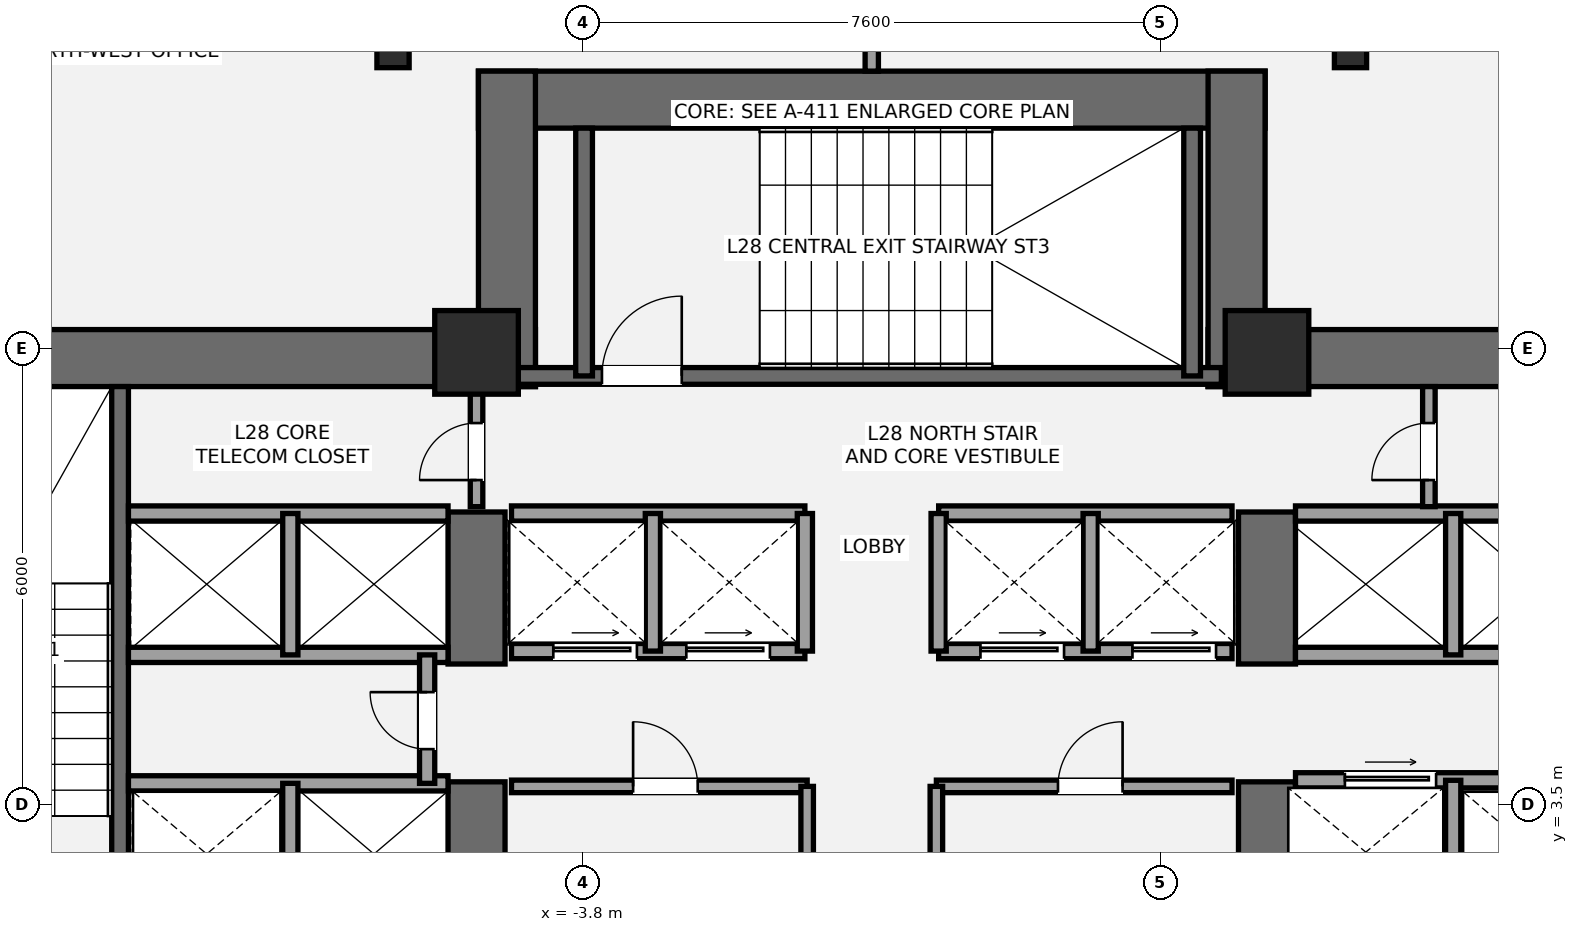
"""IFC4 building model, lengths in metres.
Left out: names, types, materials, properties, quantities, classifications, styles, units other than length and angle.
Written with IfcOpenShell. Run it as: python <this file> out.ifc"""

import sys

from ifc_helpers import new_model, si_unit, direction, frame, frame_2d, origin, origin_2d, place, context, subcontext, project, spatial, rectangle, i_section, extrude, element, fill, save


model = new_model("IFC4")
c1 = context("Model", 3, precision=1e-05, world=origin(), true_north=direction((0.0, 1.0)))
c2 = subcontext(c1, "Body", "Model", "MODEL_VIEW")
j1 = project(units=[si_unit("LENGTHUNIT", "METRE"), si_unit("PLANEANGLEUNIT", "RADIAN")], contexts=[c1])
p1 = place(None, origin())
s1 = spatial("IfcSite", under=j1, at=p1, CompositionType="ELEMENT")
p2 = place(p1, origin())
s2 = spatial("IfcBuilding", under=s1, at=p2, CompositionType="ELEMENT")
p3 = place(p2, frame((0.0, 0.0, 107.1)))
s3 = spatial("IfcBuildingStorey", under=s2, at=p3, CompositionType="ELEMENT", Elevation=107.1)
p4 = place(p3, frame((-13.9, 9.375, 0.0), z_axis=(0.0, 0.0, 1.0), x_axis=(1.0, 0.0, 0.0)))
e1 = element("IfcWall", 1, at=p4, inside=s3, PredefinedType="SHEAR", context=c2, shape_type="SweptSolid", body=[
    extrude(rectangle(XDim=9.475, YDim=0.75, at=frame_2d((4.737, 0.0))), origin(), (0.0, 0.0, 1.0), 3.5),
])
p5 = place(p3, frame((-5.2, 1.1, 0.0), z_axis=(0.0, 0.0, 1.0), x_axis=(0.0, 1.0, 0.0)))
e2 = element("IfcWall", 2, at=p5, inside=s3, PredefinedType="SHEAR", context=c2, shape_type="SweptSolid", body=[
    extrude(rectangle(XDim=2.7, YDim=0.75, at=frame_2d((1.35, 0.0))), origin(), (0.0, 0.0, 1.0), 3.5),
])
p6 = place(p3, frame((-5.2, 5.35, 0.0), z_axis=(0.0, 0.0, 1.0), x_axis=(0.0, 1.0, 0.0)))
e3 = element("IfcWall", 3, at=p6, inside=s3, PredefinedType="SHEAR", context=c2, shape_type="SweptSolid", body=[
    extrude(rectangle(XDim=2.0, YDim=0.75, at=frame_2d((1.0, 0.0))), origin(), (0.0, 0.0, 1.0), 3.5),
])
p7 = place(p3, frame((-9.89, 1.85, 0.0), z_axis=(0.0, 0.0, 1.0), x_axis=(0.0, 1.0, 0.0)))
e4 = element("IfcWall", 4, at=p7, inside=s3, PredefinedType="SHEAR", context=c2, shape_type="SweptSolid", body=[
    extrude(rectangle(XDim=7.15, YDim=0.22, at=frame_2d((3.575, 0.0))), origin(), (0.0, 0.0, 1.0), 3.5),
])
p8 = place(p3, frame((4.425, 9.375, 0.0), z_axis=(0.0, 0.0, 1.0), x_axis=(1.0, 0.0, 0.0)))
e5 = element("IfcWall", 5, at=p8, inside=s3, PredefinedType="SHEAR", context=c2, shape_type="SweptSolid", body=[
    extrude(rectangle(XDim=9.475, YDim=0.75, at=frame_2d((4.737, 0.0))), origin(), (0.0, 0.0, 1.0), 3.5),
])
p9 = place(p3, frame((5.2, 1.1, 0.0), z_axis=(0.0, 0.0, 1.0), x_axis=(0.0, 1.0, 0.0)))
e6 = element("IfcWall", 6, at=p9, inside=s3, PredefinedType="SHEAR", context=c2, shape_type="SweptSolid", body=[
    extrude(rectangle(XDim=2.7, YDim=0.75, at=frame_2d((1.35, 0.0))), origin(), (0.0, 0.0, 1.0), 3.5),
])
p10 = place(p3, frame((5.2, 5.35, 0.0), z_axis=(0.0, 0.0, 1.0), x_axis=(0.0, 1.0, 0.0)))
e7 = element("IfcWall", 7, at=p10, inside=s3, PredefinedType="SHEAR", context=c2, shape_type="SweptSolid", body=[
    extrude(rectangle(XDim=2.0, YDim=0.75, at=frame_2d((1.0, 0.0))), origin(), (0.0, 0.0, 1.0), 3.5),
])
p11 = place(p3, frame((-5.175, 12.775, 0.0), z_axis=(0.0, 0.0, 1.0), x_axis=(1.0, 0.0, 0.0)))
e8 = element("IfcWall", 8, at=p11, inside=s3, PredefinedType="SHEAR", context=c2, shape_type="SweptSolid", body=[
    extrude(rectangle(XDim=10.35, YDim=0.75, at=frame_2d((5.175, 0.0))), origin(), (0.0, 0.0, 1.0), 3.5),
])
for number, where, z_axis, x_axis in (
    (9, (-4.8, 9.0, 0.0), (0.0, 0.0, 1.0), (0.0, 1.0, 0.0)),
    (10, (4.8, 9.0, 0.0), (0.0, 0.0, 1.0), (0.0, 1.0, 0.0)),
):
    element("IfcWall", number, at=place(p3, frame(where, z_axis=z_axis, x_axis=x_axis)), inside=s3, PredefinedType="SHEAR", context=c2, shape_type="SweptSolid", body=[
        extrude(rectangle(XDim=4.15, YDim=0.75, at=frame_2d((2.075, 0.0))), origin(), (0.0, 0.0, 1.0), 3.5),
    ])
p12 = place(p3, frame((-4.7, 9.14, 0.0), z_axis=(0.0, 0.0, 1.0), x_axis=(1.0, 0.0, 0.0)))
e11 = element("IfcWall", 11, at=p12, inside=s3, PredefinedType="SHEAR", context=c2, shape_type="SweptSolid", body=[
    extrude(rectangle(XDim=9.3, YDim=0.22, at=frame_2d((4.65, 0.0))), origin(), (0.0, 0.0, 1.0), 3.5),
])
p13 = place(p12, frame((1.15, 0.0, 0.0)))
e12 = element("IfcOpeningElement", 12, at=p13, cuts=e11, PredefinedType="OPENING", context=c2, shape_type="SweptSolid", body=[
    extrude(rectangle(XDim=1.05, YDim=2.15, at=frame_2d((0.525, 1.075))), frame((0.0, 0.12, 0.0), z_axis=(0.0, -1.0, 0.0), x_axis=(1.0, 0.0, 0.0)), (0.0, 0.0, 1.0), 0.24),
])
for number, where, z_axis, x_axis in (
    (13, (-3.785, 9.14, 0.0), (0.0, 0.0, 1.0), (0.0, 1.0, 0.0)),
    (14, (4.215, 9.14, 0.0), (0.0, 0.0, 1.0), (0.0, 1.0, 0.0)),
):
    element("IfcWall", number, at=place(p3, frame(where, z_axis=z_axis, x_axis=x_axis)), inside=s3, PredefinedType="SHEAR", context=c2, shape_type="SweptSolid", body=[
        extrude(rectangle(XDim=3.26, YDim=0.22, at=frame_2d((1.63, 0.0))), origin(), (0.0, 0.0, 1.0), 3.5),
    ])
for number, where, z_axis, x_axis in (
    (15, (-5.2, 9.45, 0.0), (0.0, 0.0, 1.0), (1.0, 0.0, 0.0)),
    (16, (5.2, 9.45, 0.0), (0.0, 0.0, 1.0), (1.0, 0.0, 0.0)),
):
    element("IfcColumn", number, at=place(p3, frame(where, z_axis=z_axis, x_axis=x_axis)), inside=s3, PredefinedType="COLUMN", context=c2, shape_type="SweptSolid", body=[
        extrude(rectangle(XDim=1.1, YDim=1.1, at=origin_2d()), origin(), (0.0, 0.0, 1.0), 3.5),
    ])
for number, where, z_axis, x_axis in (
    (17, (6.299, 13.433, 0.0), (0.0, 0.0, 1.0), (1.0, 0.0, 0.0)),
    (18, (-6.299, 13.433, 0.0), (0.0, 0.0, 1.0), (1.0, 0.0, 0.0)),
):
    element("IfcColumn", number, at=place(p3, frame(where, z_axis=z_axis, x_axis=x_axis)), inside=s3, PredefinedType="COLUMN", context=c2, shape_type="SweptSolid", body=[
        extrude(i_section(OverallWidth=0.424, OverallDepth=0.474, WebThickness=0.048, FlangeThickness=0.077, at=origin_2d()), origin(), (0.0, 0.0, 1.0), 3.5),
    ])
p14 = place(p3, frame((-9.78, 3.78, 0.0), z_axis=(0.0, 0.0, 1.0), x_axis=(1.0, 0.0, 0.0)))
e19 = element("IfcWall", 19, at=p14, inside=s3, PredefinedType="SOLIDWALL", context=c2, shape_type="SweptSolid", body=[
    extrude(rectangle(XDim=4.205, YDim=0.2, at=frame_2d((2.103, 0.0))), origin(), (0.0, 0.0, 1.0), 3.31),
])
p15 = place(p3, frame((-7.65, 1.85, 0.0), z_axis=(0.0, 0.0, 1.0), x_axis=(0.0, 1.0, 0.0)))
e20 = element("IfcWall", 20, at=p15, inside=s3, PredefinedType="SOLIDWALL", context=c2, shape_type="SweptSolid", body=[
    extrude(rectangle(XDim=1.93, YDim=0.2, at=frame_2d((0.965, 0.0))), origin(), (0.0, 0.0, 1.0), 3.31),
])
for number, where, z_axis, x_axis in (
    (21, (-9.78, 5.47, 0.0), (0.0, 0.0, 1.0), (1.0, 0.0, 0.0)),
    (22, (-9.78, 7.33, 0.0), (0.0, 0.0, 1.0), (1.0, 0.0, 0.0)),
):
    element("IfcWall", number, at=place(p3, frame(where, z_axis=z_axis, x_axis=x_axis)), inside=s3, PredefinedType="SOLIDWALL", context=c2, shape_type="SweptSolid", body=[
        extrude(rectangle(XDim=4.205, YDim=0.2, at=frame_2d((2.103, 0.0))), origin(), (0.0, 0.0, 1.0), 3.31),
    ])
p16 = place(p3, frame((-7.65, 5.47, 0.0), z_axis=(0.0, 0.0, 1.0), x_axis=(0.0, 1.0, 0.0)))
e23 = element("IfcWall", 23, at=p16, inside=s3, PredefinedType="SOLIDWALL", context=c2, shape_type="SweptSolid", body=[
    extrude(rectangle(XDim=1.86, YDim=0.2, at=frame_2d((0.93, 0.0))), origin(), (0.0, 0.0, 1.0), 3.31),
])
p17 = place(p3, frame((-5.85, 3.78, 0.0), z_axis=(0.0, 0.0, 1.0), x_axis=(0.0, 1.0, 0.0)))
e24 = element("IfcWall", 24, at=p17, inside=s3, PredefinedType="SOLIDWALL", context=c2, shape_type="SweptSolid", body=[
    extrude(rectangle(XDim=1.69, YDim=0.2, at=frame_2d((0.845, 0.0))), origin(), (0.0, 0.0, 1.0), 3.31),
])
p18 = place(p17, frame((0.45, 0.0, 0.0)))
e25 = element("IfcOpeningElement", 25, at=p18, cuts=e24, PredefinedType="OPENING", context=c2, shape_type="SweptSolid", body=[
    extrude(rectangle(XDim=0.75, YDim=2.1, at=frame_2d((0.375, 1.05))), frame((0.0, 0.11, 0.0), z_axis=(0.0, -1.0, 0.0), x_axis=(1.0, 0.0, 0.0)), (0.0, 0.0, 1.0), 0.22),
])
p19 = place(p3, frame((5.575, 3.82, 0.0), z_axis=(0.0, 0.0, 1.0), x_axis=(1.0, 0.0, 0.0)))
e26 = element("IfcWall", 26, at=p19, inside=s3, PredefinedType="SOLIDWALL", context=c2, shape_type="SweptSolid", body=[
    extrude(rectangle(XDim=4.205, YDim=0.2, at=frame_2d((2.103, 0.0))), origin(), (0.0, 0.0, 1.0), 3.31),
])
p20 = place(p19, frame((0.65, 0.0, 0.0)))
e27 = element("IfcOpeningElement", 27, at=p20, cuts=e26, PredefinedType="OPENING", context=c2, shape_type="SweptSolid", body=[
    extrude(rectangle(XDim=1.2, YDim=2.2, at=frame_2d((0.6, 1.1))), frame((0.0, 0.11, 0.0), z_axis=(0.0, -1.0, 0.0), x_axis=(1.0, 0.0, 0.0)), (0.0, 0.0, 1.0), 0.22),
])
p21 = place(p3, frame((7.65, 1.85, 0.0), z_axis=(0.0, 0.0, 1.0), x_axis=(0.0, 1.0, 0.0)))
e28 = element("IfcWall", 28, at=p21, inside=s3, PredefinedType="SOLIDWALL", context=c2, shape_type="SweptSolid", body=[
    extrude(rectangle(XDim=1.97, YDim=0.2, at=frame_2d((0.985, 0.0))), origin(), (0.0, 0.0, 1.0), 3.31),
])
for number, where, z_axis, x_axis in (
    (29, (5.575, 5.47, 0.0), (0.0, 0.0, 1.0), (1.0, 0.0, 0.0)),
    (30, (5.575, 7.33, 0.0), (0.0, 0.0, 1.0), (1.0, 0.0, 0.0)),
):
    element("IfcWall", number, at=place(p3, frame(where, z_axis=z_axis, x_axis=x_axis)), inside=s3, PredefinedType="SOLIDWALL", context=c2, shape_type="SweptSolid", body=[
        extrude(rectangle(XDim=4.205, YDim=0.2, at=frame_2d((2.103, 0.0))), origin(), (0.0, 0.0, 1.0), 3.31),
    ])
p22 = place(p3, frame((7.65, 5.47, 0.0), z_axis=(0.0, 0.0, 1.0), x_axis=(0.0, 1.0, 0.0)))
e31 = element("IfcWall", 31, at=p22, inside=s3, PredefinedType="SOLIDWALL", context=c2, shape_type="SweptSolid", body=[
    extrude(rectangle(XDim=1.86, YDim=0.2, at=frame_2d((0.93, 0.0))), origin(), (0.0, 0.0, 1.0), 3.31),
])
p23 = place(p3, frame((-4.74, 3.74, 0.0), z_axis=(0.0, 0.0, 1.0), x_axis=(1.0, 0.0, 0.0)))
e32 = element("IfcWall", 32, at=p23, inside=s3, PredefinedType="PARTITIONING", context=c2, shape_type="SweptSolid", body=[
    extrude(rectangle(XDim=3.89, YDim=0.165, at=frame_2d((1.945, 0.0))), origin(), (0.0, 0.0, 1.0), 3.31),
])
p24 = place(p23, frame((1.6, 0.0, 0.0)))
e33 = element("IfcOpeningElement", 33, at=p24, cuts=e32, PredefinedType="OPENING", context=c2, shape_type="SweptSolid", body=[
    extrude(rectangle(XDim=0.85, YDim=2.1, at=frame_2d((0.425, 1.05))), frame((0.0, 0.093, 0.0), z_axis=(0.0, -1.0, 0.0), x_axis=(1.0, 0.0, 0.0)), (0.0, 0.0, 1.0), 0.185),
])
p25 = place(p3, frame((-0.85, 1.92, 0.0), z_axis=(0.0, 0.0, 1.0), x_axis=(0.0, 1.0, 0.0)))
e34 = element("IfcWall", 34, at=p25, inside=s3, PredefinedType="PARTITIONING", context=c2, shape_type="SweptSolid", body=[
    extrude(rectangle(XDim=1.82, YDim=0.165, at=frame_2d((0.91, 0.0))), origin(), (0.0, 0.0, 1.0), 3.31),
])
p26 = place(p3, frame((0.85, 3.74, 0.0), z_axis=(0.0, 0.0, 1.0), x_axis=(1.0, 0.0, 0.0)))
e35 = element("IfcWall", 35, at=p26, inside=s3, PredefinedType="PARTITIONING", context=c2, shape_type="SweptSolid", body=[
    extrude(rectangle(XDim=3.89, YDim=0.165, at=frame_2d((1.945, 0.0))), origin(), (0.0, 0.0, 1.0), 3.31),
])
p27 = place(p26, frame((1.6, 0.0, 0.0)))
e36 = element("IfcOpeningElement", 36, at=p27, cuts=e35, PredefinedType="OPENING", context=c2, shape_type="SweptSolid", body=[
    extrude(rectangle(XDim=0.85, YDim=2.1, at=frame_2d((0.425, 1.05))), frame((0.0, 0.093, 0.0), z_axis=(0.0, -1.0, 0.0), x_axis=(1.0, 0.0, 0.0)), (0.0, 0.0, 1.0), 0.185),
])
p28 = place(p3, frame((0.85, 1.92, 0.0), z_axis=(0.0, 0.0, 1.0), x_axis=(0.0, 1.0, 0.0)))
e37 = element("IfcWall", 37, at=p28, inside=s3, PredefinedType="PARTITIONING", context=c2, shape_type="SweptSolid", body=[
    extrude(rectangle(XDim=1.82, YDim=0.165, at=frame_2d((0.91, 0.0))), origin(), (0.0, 0.0, 1.0), 3.31),
])
p29 = place(p3, frame((-4.74, 5.52, 0.0), z_axis=(0.0, 0.0, 1.0), x_axis=(1.0, 0.0, 0.0)))
e38 = element("IfcWall", 38, at=p29, inside=s3, PredefinedType="SOLIDWALL", context=c2, shape_type="SweptSolid", body=[
    extrude(rectangle(XDim=3.86, YDim=0.2, at=frame_2d((1.93, 0.0))), origin(), (0.0, 0.0, 1.0), 3.31),
])
p30 = place(p29, frame((0.55, 0.0, 0.0)))
e39 = element("IfcOpeningElement", 39, at=p30, cuts=e38, PredefinedType="OPENING", context=c2, shape_type="SweptSolid", body=[
    extrude(rectangle(XDim=1.1, YDim=2.2, at=frame_2d((0.55, 1.1))), frame((0.0, 0.11, 0.0), z_axis=(0.0, -1.0, 0.0), x_axis=(1.0, 0.0, 0.0)), (0.0, 0.0, 1.0), 0.22),
])
p31 = place(p29, frame((2.3, 0.0, 0.0)))
e40 = element("IfcOpeningElement", 40, at=p31, cuts=e38, PredefinedType="OPENING", context=c2, shape_type="SweptSolid", body=[
    extrude(rectangle(XDim=1.1, YDim=2.2, at=frame_2d((0.55, 1.1))), frame((0.0, 0.11, 0.0), z_axis=(0.0, -1.0, 0.0), x_axis=(1.0, 0.0, 0.0)), (0.0, 0.0, 1.0), 0.22),
])
p32 = place(p3, frame((0.88, 5.52, 0.0), z_axis=(0.0, 0.0, 1.0), x_axis=(1.0, 0.0, 0.0)))
e41 = element("IfcWall", 41, at=p32, inside=s3, PredefinedType="SOLIDWALL", context=c2, shape_type="SweptSolid", body=[
    extrude(rectangle(XDim=3.86, YDim=0.2, at=frame_2d((1.93, 0.0))), origin(), (0.0, 0.0, 1.0), 3.31),
])
p33 = place(p32, frame((0.55, 0.0, 0.0)))
e42 = element("IfcOpeningElement", 42, at=p33, cuts=e41, PredefinedType="OPENING", context=c2, shape_type="SweptSolid", body=[
    extrude(rectangle(XDim=1.1, YDim=2.2, at=frame_2d((0.55, 1.1))), frame((0.0, 0.11, 0.0), z_axis=(0.0, -1.0, 0.0), x_axis=(1.0, 0.0, 0.0)), (0.0, 0.0, 1.0), 0.22),
])
p34 = place(p32, frame((2.55, 0.0, 0.0)))
e43 = element("IfcOpeningElement", 43, at=p34, cuts=e41, PredefinedType="OPENING", context=c2, shape_type="SweptSolid", body=[
    extrude(rectangle(XDim=1.1, YDim=2.2, at=frame_2d((0.55, 1.1))), frame((0.0, 0.11, 0.0), z_axis=(0.0, -1.0, 0.0), x_axis=(1.0, 0.0, 0.0)), (0.0, 0.0, 1.0), 0.22),
])
for number, where, z_axis, x_axis in (
    (44, (-4.74, 7.33, 0.0), (0.0, 0.0, 1.0), (1.0, 0.0, 0.0)),
    (45, (0.88, 7.33, 0.0), (0.0, 0.0, 1.0), (1.0, 0.0, 0.0)),
):
    element("IfcWall", number, at=place(p3, frame(where, z_axis=z_axis, x_axis=x_axis)), inside=s3, PredefinedType="SOLIDWALL", context=c2, shape_type="SweptSolid", body=[
        extrude(rectangle(XDim=3.86, YDim=0.2, at=frame_2d((1.93, 0.0))), origin(), (0.0, 0.0, 1.0), 3.31),
    ])
for number, where, z_axis, x_axis in (
    (46, (-2.88, 5.52, 0.0), (0.0, 0.0, 1.0), (0.0, 1.0, 0.0)),
    (47, (2.88, 5.52, 0.0), (0.0, 0.0, 1.0), (0.0, 1.0, 0.0)),
    (48, (-0.88, 5.52, 0.0), (0.0, 0.0, 1.0), (0.0, 1.0, 0.0)),
    (49, (0.88, 5.52, 0.0), (0.0, 0.0, 1.0), (0.0, 1.0, 0.0)),
):
    element("IfcWall", number, at=place(p3, frame(where, z_axis=z_axis, x_axis=x_axis)), inside=s3, PredefinedType="SOLIDWALL", context=c2, shape_type="SweptSolid", body=[
        extrude(rectangle(XDim=1.81, YDim=0.2, at=frame_2d((0.905, 0.0))), origin(), (0.0, 0.0, 1.0), 3.31),
    ])
p35 = place(p3, frame((-5.2, 7.42, 0.0), z_axis=(0.0, 0.0, 1.0), x_axis=(0.0, 1.0, 0.0)))
e50 = element("IfcWall", 50, at=p35, inside=s3, PredefinedType="PARTITIONING", context=c2, shape_type="SweptSolid", body=[
    extrude(rectangle(XDim=1.58, YDim=0.165, at=frame_2d((0.79, 0.0))), origin(), (0.0, 0.0, 1.0), 3.31),
])
p36 = place(p35, frame((0.35, 0.0, 0.0)))
e51 = element("IfcOpeningElement", 51, at=p36, cuts=e50, PredefinedType="OPENING", context=c2, shape_type="SweptSolid", body=[
    extrude(rectangle(XDim=0.75, YDim=2.1, at=frame_2d((0.375, 1.05))), frame((0.0, 0.093, 0.0), z_axis=(0.0, -1.0, 0.0), x_axis=(1.0, 0.0, 0.0)), (0.0, 0.0, 1.0), 0.185),
])
p37 = place(p3, frame((7.33, 7.42, 0.0), z_axis=(0.0, 0.0, 1.0), x_axis=(0.0, 1.0, 0.0)))
e52 = element("IfcWall", 52, at=p37, inside=s3, PredefinedType="PARTITIONING", context=c2, shape_type="SweptSolid", body=[
    extrude(rectangle(XDim=1.58, YDim=0.165, at=frame_2d((0.79, 0.0))), origin(), (0.0, 0.0, 1.0), 3.31),
])
p38 = place(p37, frame((0.35, 0.0, 0.0)))
e53 = element("IfcOpeningElement", 53, at=p38, cuts=e52, PredefinedType="OPENING", context=c2, shape_type="SweptSolid", body=[
    extrude(rectangle(XDim=0.75, YDim=2.1, at=frame_2d((0.375, 1.05))), frame((0.0, 0.093, 0.0), z_axis=(0.0, -1.0, 0.0), x_axis=(1.0, 0.0, 0.0)), (0.0, 0.0, 1.0), 0.185),
])
p39 = place(p3, frame((0.0, 13.15, 0.0), z_axis=(0.0, 0.0, 1.0), x_axis=(0.0, 1.0, 0.0)))
e54 = element("IfcWall", 54, at=p39, inside=s3, PredefinedType="PARTITIONING", context=c2, shape_type="SweptSolid", body=[
    extrude(rectangle(XDim=5.19, YDim=0.175, at=frame_2d((2.595, 0.0))), origin(), (0.0, 0.0, 1.0), 3.31),
])
p40 = place(p13, origin())
e55 = element("IfcDoor", 55, at=p40, inside=s3, OperationType="SINGLE_SWING_RIGHT", PredefinedType="DOOR", context=c2, shape_type="SweptSolid", body=[
    extrude(rectangle(XDim=1.05, YDim=2.15, at=frame_2d((0.525, 1.075))), frame((0.0, 0.025, 0.0), z_axis=(0.0, -1.0, 0.0), x_axis=(1.0, 0.0, 0.0)), (0.0, 0.0, 1.0), 0.05),
])
fill(e12, e55)
p41 = place(p18, origin())
e56 = element("IfcDoor", 56, at=p41, inside=s3, OperationType="SINGLE_SWING_RIGHT", PredefinedType="DOOR", context=c2, shape_type="SweptSolid", body=[
    extrude(rectangle(XDim=0.75, YDim=2.1, at=frame_2d((0.375, 1.05))), frame((0.0, 0.025, 0.0), z_axis=(0.0, -1.0, 0.0), x_axis=(1.0, 0.0, 0.0)), (0.0, 0.0, 1.0), 0.05),
])
fill(e25, e56)
p42 = place(p20, origin())
e57 = element("IfcDoor", 57, at=p42, inside=s3, OperationType="SLIDING_TO_RIGHT", PredefinedType="DOOR", context=c2, shape_type="SweptSolid", body=[
    extrude(rectangle(XDim=1.2, YDim=2.2, at=frame_2d((0.6, 1.1))), frame((0.0, 0.025, 0.0), z_axis=(0.0, -1.0, 0.0), x_axis=(1.0, 0.0, 0.0)), (0.0, 0.0, 1.0), 0.05),
])
fill(e27, e57)
p43 = place(p24, origin())
e58 = element("IfcDoor", 58, at=p43, inside=s3, OperationType="SINGLE_SWING_LEFT", PredefinedType="DOOR", context=c2, shape_type="SweptSolid", body=[
    extrude(rectangle(XDim=0.85, YDim=2.1, at=frame_2d((0.425, 1.05))), frame((0.0, 0.025, 0.0), z_axis=(0.0, -1.0, 0.0), x_axis=(1.0, 0.0, 0.0)), (0.0, 0.0, 1.0), 0.05),
])
fill(e33, e58)
p44 = place(p27, origin())
e59 = element("IfcDoor", 59, at=p44, inside=s3, OperationType="SINGLE_SWING_RIGHT", PredefinedType="DOOR", context=c2, shape_type="SweptSolid", body=[
    extrude(rectangle(XDim=0.85, YDim=2.1, at=frame_2d((0.425, 1.05))), frame((0.0, 0.025, 0.0), z_axis=(0.0, -1.0, 0.0), x_axis=(1.0, 0.0, 0.0)), (0.0, 0.0, 1.0), 0.05),
])
fill(e36, e59)
p45 = place(p30, origin())
e60 = element("IfcDoor", 60, at=p45, inside=s3, OperationType="SLIDING_TO_LEFT", PredefinedType="DOOR", context=c2, shape_type="SweptSolid", body=[
    extrude(rectangle(XDim=1.1, YDim=2.2, at=frame_2d((0.55, 1.1))), frame((0.0, 0.025, 0.0), z_axis=(0.0, -1.0, 0.0), x_axis=(1.0, 0.0, 0.0)), (0.0, 0.0, 1.0), 0.05),
])
fill(e39, e60)
p46 = place(p31, origin())
e61 = element("IfcDoor", 61, at=p46, inside=s3, OperationType="SLIDING_TO_LEFT", PredefinedType="DOOR", context=c2, shape_type="SweptSolid", body=[
    extrude(rectangle(XDim=1.1, YDim=2.2, at=frame_2d((0.55, 1.1))), frame((0.0, 0.025, 0.0), z_axis=(0.0, -1.0, 0.0), x_axis=(1.0, 0.0, 0.0)), (0.0, 0.0, 1.0), 0.05),
])
fill(e40, e61)
p47 = place(p33, origin())
e62 = element("IfcDoor", 62, at=p47, inside=s3, OperationType="SLIDING_TO_LEFT", PredefinedType="DOOR", context=c2, shape_type="SweptSolid", body=[
    extrude(rectangle(XDim=1.1, YDim=2.2, at=frame_2d((0.55, 1.1))), frame((0.0, 0.025, 0.0), z_axis=(0.0, -1.0, 0.0), x_axis=(1.0, 0.0, 0.0)), (0.0, 0.0, 1.0), 0.05),
])
fill(e42, e62)
p48 = place(p34, origin())
e63 = element("IfcDoor", 63, at=p48, inside=s3, OperationType="SLIDING_TO_LEFT", PredefinedType="DOOR", context=c2, shape_type="SweptSolid", body=[
    extrude(rectangle(XDim=1.1, YDim=2.2, at=frame_2d((0.55, 1.1))), frame((0.0, 0.025, 0.0), z_axis=(0.0, -1.0, 0.0), x_axis=(1.0, 0.0, 0.0)), (0.0, 0.0, 1.0), 0.05),
])
fill(e43, e63)
p49 = place(p36, origin())
e64 = element("IfcDoor", 64, at=p49, inside=s3, OperationType="SINGLE_SWING_LEFT", PredefinedType="DOOR", context=c2, shape_type="SweptSolid", body=[
    extrude(rectangle(XDim=0.75, YDim=2.1, at=frame_2d((0.375, 1.05))), frame((0.0, 0.025, 0.0), z_axis=(0.0, -1.0, 0.0), x_axis=(1.0, 0.0, 0.0)), (0.0, 0.0, 1.0), 0.05),
])
fill(e51, e64)
p50 = place(p38, origin())
e65 = element("IfcDoor", 65, at=p50, inside=s3, OperationType="SINGLE_SWING_LEFT", PredefinedType="DOOR", context=c2, shape_type="SweptSolid", body=[
    extrude(rectangle(XDim=0.75, YDim=2.1, at=frame_2d((0.375, 1.05))), frame((0.0, 0.025, 0.0), z_axis=(0.0, -1.0, 0.0), x_axis=(1.0, 0.0, 0.0)), (0.0, 0.0, 1.0), 0.05),
])
fill(e53, e65)
save(model, sys.argv[1])
